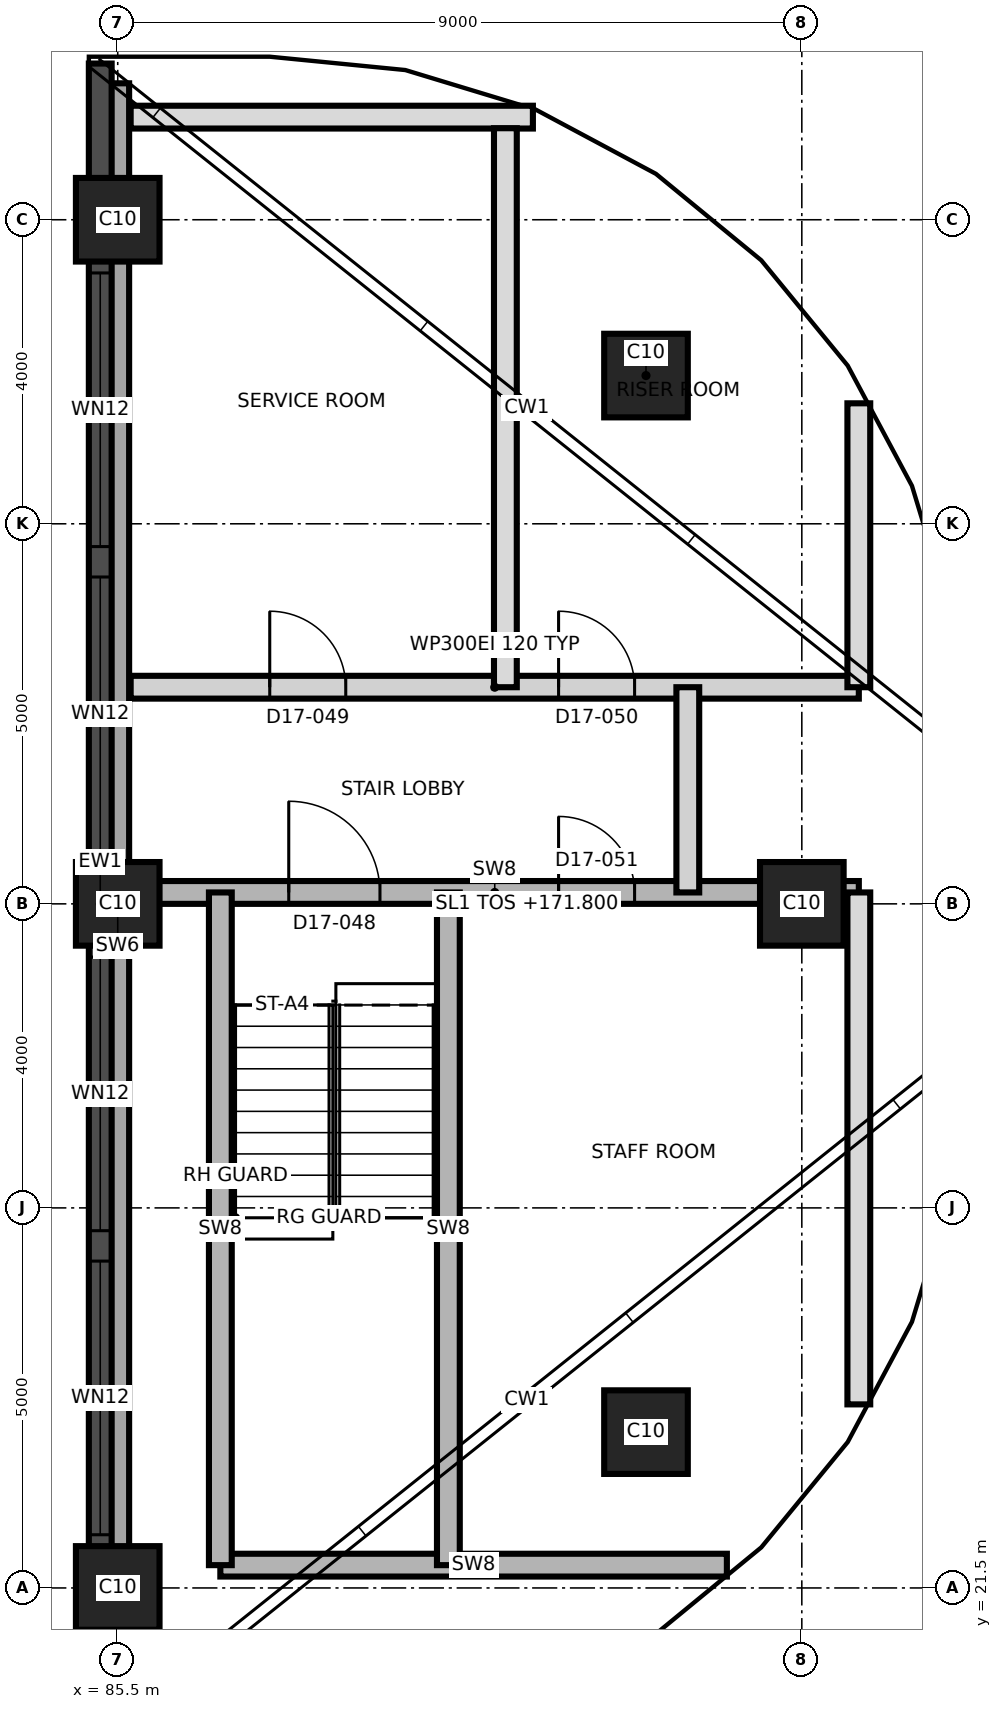
"""IFC4 building model, lengths in metres.
Left out: names, types, materials, properties, quantities, classifications, styles, units other than length and angle.
Written with IfcOpenShell. Run it as: python <this file> out.ifc"""

import sys

from ifc_helpers import new_model, si_unit, direction, frame, frame_2d, origin, origin_2d, place, context, subcontext, project, spatial, rectangle, extrude, element, fill, save


model = new_model("IFC4")
c1 = context("Model", 3, precision=1e-05, world=origin(), true_north=direction((0.0, 1.0)))
c2 = subcontext(c1, "Body", "Model", "MODEL_VIEW")
j1 = project(units=[si_unit("LENGTHUNIT", "METRE"), si_unit("PLANEANGLEUNIT", "RADIAN")], contexts=[c1])
p1 = place(None, origin())
s1 = spatial("IfcSite", under=j1, at=p1, CompositionType="ELEMENT")
p2 = place(p1, origin())
s2 = spatial("IfcBuilding", under=s1, at=p2, CompositionType="ELEMENT")
p3 = place(p2, frame((0.0, 0.0, 171.8)))
s3 = spatial("IfcBuildingStorey", under=s2, at=p3, CompositionType="ELEMENT", Elevation=171.8)
for number, where, z_axis, x_axis in (
    (1, (85.5, 21.5, 0.0), (0.0, 0.0, 1.0), (1.0, 0.0, 0.0)),
    (2, (92.45, 23.55, 0.0), (0.0, 0.0, 1.0), (1.0, 0.0, 0.0)),
    (3, (85.5, 30.5, 0.0), (0.0, 0.0, 1.0), (1.0, 0.0, 0.0)),
    (4, (94.5, 30.5, 0.0), (0.0, 0.0, 1.0), (1.0, 0.0, 0.0)),
    (5, (92.45, 37.45, 0.0), (0.0, 0.0, 1.0), (1.0, 0.0, 0.0)),
    (6, (85.5, 39.5, 0.0), (0.0, 0.0, 1.0), (1.0, 0.0, 0.0)),
):
    element("IfcColumn", number, at=place(p3, frame(where, z_axis=z_axis, x_axis=x_axis)), inside=s3, PredefinedType="COLUMN", context=c2, shape_type="SweptSolid", body=[
        extrude(rectangle(XDim=1.1, YDim=1.1, at=origin_2d()), origin(), (0.0, 0.0, 1.0), 3.7),
    ])
p4 = place(p3, frame((85.5, 19.705, 0.0), z_axis=(0.0, 0.0, 1.0), x_axis=(0.0, 1.0, 0.0)))
e7 = element("IfcWall", 7, at=p4, inside=s3, PredefinedType="SHEAR", context=c2, shape_type="SweptSolid", body=[
    extrude(rectangle(XDim=21.59, YDim=0.3, at=frame_2d((10.795, 0.0))), origin(), (0.0, 0.0, 1.0), 3.7),
])
p5 = place(p3, frame((85.27, 41.555, 0.0), z_axis=(0.0, 0.0, 1.0), x_axis=(0.0, -1.0, 0.0)))
e8 = element("IfcWall", 8, at=p5, inside=s3, PredefinedType="SOLIDWALL", context=c2, shape_type="SweptSolid", body=[
    extrude(rectangle(XDim=22.116, YDim=0.3, at=frame_2d((11.058, 0.0))), origin(), (0.0, 0.0, 1.0), 3.4),
])
p6 = place(p5, frame((2.755, 0.0, 0.9)))
e9 = element("IfcOpeningElement", 9, at=p6, cuts=e8, PredefinedType="OPENING", context=c2, shape_type="SweptSolid", body=[
    extrude(rectangle(XDim=3.6, YDim=1.5, at=frame_2d((1.8, 0.75))), frame((0.0, 0.16, 0.0), z_axis=(0.0, -1.0, 0.0), x_axis=(1.0, 0.0, 0.0)), (0.0, 0.0, 1.0), 0.32),
])
p7 = place(p5, frame((6.755, 0.0, 0.9)))
e10 = element("IfcOpeningElement", 10, at=p7, cuts=e8, PredefinedType="OPENING", context=c2, shape_type="SweptSolid", body=[
    extrude(rectangle(XDim=3.6, YDim=1.5, at=frame_2d((1.8, 0.75))), frame((0.0, 0.16, 0.0), z_axis=(0.0, -1.0, 0.0), x_axis=(1.0, 0.0, 0.0)), (0.0, 0.0, 1.0), 0.32),
])
p8 = place(p5, frame((11.755, 0.0, 0.9)))
e11 = element("IfcOpeningElement", 11, at=p8, cuts=e8, PredefinedType="OPENING", context=c2, shape_type="SweptSolid", body=[
    extrude(rectangle(XDim=3.6, YDim=1.5, at=frame_2d((1.8, 0.75))), frame((0.0, 0.16, 0.0), z_axis=(0.0, -1.0, 0.0), x_axis=(1.0, 0.0, 0.0)), (0.0, 0.0, 1.0), 0.32),
])
p9 = place(p5, frame((15.755, 0.0, 0.9)))
e12 = element("IfcOpeningElement", 12, at=p9, cuts=e8, PredefinedType="OPENING", context=c2, shape_type="SweptSolid", body=[
    extrude(rectangle(XDim=3.6, YDim=1.5, at=frame_2d((1.8, 0.75))), frame((0.0, 0.16, 0.0), z_axis=(0.0, -1.0, 0.0), x_axis=(1.0, 0.0, 0.0)), (0.0, 0.0, 1.0), 0.32),
])
p10 = place(p3, frame((86.85, 21.8, 0.0), z_axis=(0.0, 0.0, 1.0), x_axis=(1.0, 0.0, 0.0)))
e13 = element("IfcWall", 13, at=p10, inside=s3, PredefinedType="SHEAR", context=c2, shape_type="SweptSolid", body=[
    extrude(rectangle(XDim=6.664, YDim=0.3, at=frame_2d((3.332, 0.0))), origin(), (0.0, 0.0, 1.0), 3.4),
])
p11 = place(p3, frame((85.67, 30.65, 0.0), z_axis=(0.0, 0.0, 1.0), x_axis=(1.0, 0.0, 0.0)))
e14 = element("IfcWall", 14, at=p11, inside=s3, PredefinedType="SHEAR", context=c2, shape_type="SweptSolid", body=[
    extrude(rectangle(XDim=9.58, YDim=0.3, at=frame_2d((4.79, 0.0))), origin(), (0.0, 0.0, 1.0), 3.4),
])
p12 = place(p11, frame((2.08, 0.0, 0.0)))
e15 = element("IfcOpeningElement", 15, at=p12, cuts=e14, PredefinedType="OPENING", context=c2, shape_type="SweptSolid", body=[
    extrude(rectangle(XDim=1.2, YDim=2.1, at=frame_2d((0.6, 1.05))), frame((0.0, 0.16, 0.0), z_axis=(0.0, -1.0, 0.0), x_axis=(1.0, 0.0, 0.0)), (0.0, 0.0, 1.0), 0.32),
])
p13 = place(p11, frame((5.63, 0.0, 0.0)))
e16 = element("IfcOpeningElement", 16, at=p13, cuts=e14, PredefinedType="OPENING", context=c2, shape_type="SweptSolid", body=[
    extrude(rectangle(XDim=1.0, YDim=2.1, at=frame_2d((0.5, 1.05))), frame((0.0, 0.16, 0.0), z_axis=(0.0, -1.0, 0.0), x_axis=(1.0, 0.0, 0.0)), (0.0, 0.0, 1.0), 0.32),
])
p14 = place(p3, frame((85.67, 33.35, 0.0), z_axis=(0.0, 0.0, 1.0), x_axis=(1.0, 0.0, 0.0)))
e17 = element("IfcWall", 17, at=p14, inside=s3, PredefinedType="PARTITIONING", context=c2, shape_type="SweptSolid", body=[
    extrude(rectangle(XDim=9.58, YDim=0.3, at=frame_2d((4.79, 0.0))), origin(), (0.0, 0.0, 1.0), 3.4),
])
p15 = place(p14, frame((1.83, 0.0, 0.0)))
e18 = element("IfcOpeningElement", 18, at=p15, cuts=e17, PredefinedType="OPENING", context=c2, shape_type="SweptSolid", body=[
    extrude(rectangle(XDim=1.0, YDim=2.1, at=frame_2d((0.5, 1.05))), frame((0.0, 0.16, 0.0), z_axis=(0.0, -1.0, 0.0), x_axis=(1.0, 0.0, 0.0)), (0.0, 0.0, 1.0), 0.32),
])
p16 = place(p14, frame((5.63, 0.0, 0.0)))
e19 = element("IfcOpeningElement", 19, at=p16, cuts=e17, PredefinedType="OPENING", context=c2, shape_type="SweptSolid", body=[
    extrude(rectangle(XDim=1.0, YDim=2.1, at=frame_2d((0.5, 1.05))), frame((0.0, 0.16, 0.0), z_axis=(0.0, -1.0, 0.0), x_axis=(1.0, 0.0, 0.0)), (0.0, 0.0, 1.0), 0.32),
])
p17 = place(p3, frame((85.67, 40.85, 0.0), z_axis=(0.0, 0.0, 1.0), x_axis=(1.0, 0.0, 0.0)))
e20 = element("IfcWall", 20, at=p17, inside=s3, PredefinedType="PARTITIONING", context=c2, shape_type="SweptSolid", body=[
    extrude(rectangle(XDim=5.292, YDim=0.3, at=frame_2d((2.646, 0.0))), origin(), (0.0, 0.0, 1.0), 3.4),
])
for number, where, z_axis, x_axis in (
    (21, (86.85, 21.8, 0.0), (0.0, 0.0, 1.0), (0.0, 1.0, 0.0)),
    (22, (89.85, 21.8, 0.0), (0.0, 0.0, 1.0), (0.0, 1.0, 0.0)),
):
    element("IfcWall", number, at=place(p3, frame(where, z_axis=z_axis, x_axis=x_axis)), inside=s3, PredefinedType="SHEAR", context=c2, shape_type="SweptSolid", body=[
        extrude(rectangle(XDim=8.85, YDim=0.3, at=frame_2d((4.425, 0.0))), origin(), (0.0, 0.0, 1.0), 3.4),
    ])
p18 = place(p3, frame((90.6, 33.35, 0.0), z_axis=(0.0, 0.0, 1.0), x_axis=(0.0, 1.0, 0.0)))
e23 = element("IfcWall", 23, at=p18, inside=s3, PredefinedType="PARTITIONING", context=c2, shape_type="SweptSolid", body=[
    extrude(rectangle(XDim=7.354, YDim=0.3, at=frame_2d((3.677, 0.0))), origin(), (0.0, 0.0, 1.0), 3.4),
])
p19 = place(p3, frame((93.0, 30.65, 0.0), z_axis=(0.0, 0.0, 1.0), x_axis=(0.0, 1.0, 0.0)))
e24 = element("IfcWall", 24, at=p19, inside=s3, PredefinedType="PARTITIONING", context=c2, shape_type="SweptSolid", body=[
    extrude(rectangle(XDim=2.7, YDim=0.3, at=frame_2d((1.35, 0.0))), origin(), (0.0, 0.0, 1.0), 3.4),
])
p20 = place(p3, frame((95.25, 23.915, 0.0), z_axis=(0.0, 0.0, 1.0), x_axis=(0.0, 1.0, 0.0)))
e25 = element("IfcWall", 25, at=p20, inside=s3, PredefinedType="PARTITIONING", context=c2, shape_type="SweptSolid", body=[
    extrude(rectangle(XDim=6.735, YDim=0.3, at=frame_2d((3.367, 0.0))), origin(), (0.0, 0.0, 1.0), 3.4),
])
p21 = place(p3, frame((95.25, 33.35, 0.0), z_axis=(0.0, 0.0, 1.0), x_axis=(0.0, 1.0, 0.0)))
e26 = element("IfcWall", 26, at=p21, inside=s3, PredefinedType="PARTITIONING", context=c2, shape_type="SweptSolid", body=[
    extrude(rectangle(XDim=3.735, YDim=0.3, at=frame_2d((1.867, 0.0))), origin(), (0.0, 0.0, 1.0), 3.4),
])
p22 = place(p6, origin())
e27 = element("IfcWindow", 27, at=p22, inside=s3, PartitioningType="SINGLE_PANEL", PredefinedType="WINDOW", context=c2, shape_type="SweptSolid", body=[
    extrude(rectangle(XDim=3.6, YDim=1.5, at=frame_2d((1.8, 0.75))), frame((0.0, 0.03, 0.0), z_axis=(0.0, -1.0, 0.0), x_axis=(1.0, 0.0, 0.0)), (0.0, 0.0, 1.0), 0.06),
])
fill(e9, e27)
p23 = place(p7, origin())
e28 = element("IfcWindow", 28, at=p23, inside=s3, PartitioningType="SINGLE_PANEL", PredefinedType="WINDOW", context=c2, shape_type="SweptSolid", body=[
    extrude(rectangle(XDim=3.6, YDim=1.5, at=frame_2d((1.8, 0.75))), frame((0.0, 0.03, 0.0), z_axis=(0.0, -1.0, 0.0), x_axis=(1.0, 0.0, 0.0)), (0.0, 0.0, 1.0), 0.06),
])
fill(e10, e28)
p24 = place(p8, origin())
e29 = element("IfcWindow", 29, at=p24, inside=s3, PartitioningType="SINGLE_PANEL", PredefinedType="WINDOW", context=c2, shape_type="SweptSolid", body=[
    extrude(rectangle(XDim=3.6, YDim=1.5, at=frame_2d((1.8, 0.75))), frame((0.0, 0.03, 0.0), z_axis=(0.0, -1.0, 0.0), x_axis=(1.0, 0.0, 0.0)), (0.0, 0.0, 1.0), 0.06),
])
fill(e11, e29)
p25 = place(p9, origin())
e30 = element("IfcWindow", 30, at=p25, inside=s3, PartitioningType="SINGLE_PANEL", PredefinedType="WINDOW", context=c2, shape_type="SweptSolid", body=[
    extrude(rectangle(XDim=3.6, YDim=1.5, at=frame_2d((1.8, 0.75))), frame((0.0, 0.03, 0.0), z_axis=(0.0, -1.0, 0.0), x_axis=(1.0, 0.0, 0.0)), (0.0, 0.0, 1.0), 0.06),
])
fill(e12, e30)
p26 = place(p12, origin())
e31 = element("IfcDoor", 31, at=p26, inside=s3, OperationType="SINGLE_SWING_LEFT", PredefinedType="DOOR", context=c2, shape_type="SweptSolid", body=[
    extrude(rectangle(XDim=1.2, YDim=2.1, at=frame_2d((0.6, 1.05))), frame((0.0, 0.025, 0.0), z_axis=(0.0, -1.0, 0.0), x_axis=(1.0, 0.0, 0.0)), (0.0, 0.0, 1.0), 0.05),
])
fill(e15, e31)
p27 = place(p15, origin())
e32 = element("IfcDoor", 32, at=p27, inside=s3, OperationType="SINGLE_SWING_LEFT", PredefinedType="DOOR", context=c2, shape_type="SweptSolid", body=[
    extrude(rectangle(XDim=1.0, YDim=2.1, at=frame_2d((0.5, 1.05))), frame((0.0, 0.025, 0.0), z_axis=(0.0, -1.0, 0.0), x_axis=(1.0, 0.0, 0.0)), (0.0, 0.0, 1.0), 0.05),
])
fill(e18, e32)
p28 = place(p16, origin())
e33 = element("IfcDoor", 33, at=p28, inside=s3, OperationType="SINGLE_SWING_RIGHT", PredefinedType="DOOR", context=c2, shape_type="SweptSolid", body=[
    extrude(rectangle(XDim=1.0, YDim=2.1, at=frame_2d((0.5, 1.05))), frame((0.0, 0.025, 0.0), z_axis=(0.0, -1.0, 0.0), x_axis=(1.0, 0.0, 0.0)), (0.0, 0.0, 1.0), 0.05),
])
fill(e19, e33)
p29 = place(p13, origin())
e34 = element("IfcDoor", 34, at=p29, inside=s3, OperationType="SINGLE_SWING_LEFT", PredefinedType="DOOR", context=c2, shape_type="SweptSolid", body=[
    extrude(rectangle(XDim=1.0, YDim=2.1, at=frame_2d((0.5, 1.05))), frame((0.0, 0.025, 0.0), z_axis=(0.0, -1.0, 0.0), x_axis=(1.0, 0.0, 0.0)), (0.0, 0.0, 1.0), 0.05),
])
fill(e16, e34)
save(model, sys.argv[1])
